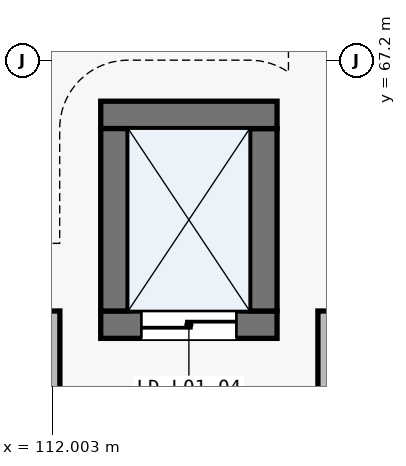
"""IFC4 building model, lengths in metres.
Left out: names, types, materials, properties, quantities, classifications, styles, units other than length and angle.
Written with IfcOpenShell. Run it as: python <this file> out.ifc"""

import sys

from ifc_helpers import new_model, si_unit, direction, frame, frame_2d, origin, place, context, subcontext, project, spatial, rectangle, extrude, element, fill, save


model = new_model("IFC4")
c1 = context("Model", 3, precision=1e-05, world=origin(), true_north=direction((0.0, 1.0)))
c2 = subcontext(c1, "Body", "Model", "MODEL_VIEW")
j1 = project(units=[si_unit("LENGTHUNIT", "METRE"), si_unit("PLANEANGLEUNIT", "RADIAN")], contexts=[c1])
p1 = place(None, origin())
s1 = spatial("IfcSite", under=j1, at=p1, CompositionType="ELEMENT")
p2 = place(p1, origin())
s2 = spatial("IfcBuilding", under=s1, at=p2, CompositionType="ELEMENT")
p3 = place(p2, origin())
s3 = spatial("IfcBuildingStorey", under=s2, at=p3, CompositionType="ELEMENT", Elevation=0.0)
p4 = place(p3, frame((112.64, 63.72, 0.0), z_axis=(0.0, 0.0, 1.0), x_axis=(1.0, 0.0, 0.0)))
e1 = element("IfcWall", 1, at=p4, inside=s3, PredefinedType="SHEAR", context=c2, shape_type="SweptSolid", body=[
    extrude(rectangle(XDim=2.32, YDim=0.36, at=frame_2d((1.16, 0.0))), origin(), (0.0, 0.0, 1.0), 5.745),
])
p5 = place(p4, frame((0.535, 0.0, 0.0)))
e2 = element("IfcOpeningElement", 2, at=p5, cuts=e1, PredefinedType="OPENING", context=c2, shape_type="SweptSolid", body=[
    extrude(rectangle(XDim=1.25, YDim=2.2, at=frame_2d((0.625, 1.1))), frame((0.0, 0.19, 0.0), z_axis=(0.0, -1.0, 0.0), x_axis=(1.0, 0.0, 0.0)), (0.0, 0.0, 1.0), 0.38),
])
p6 = place(p3, frame((114.78, 63.9, 0.0), z_axis=(0.0, 0.0, 1.0), x_axis=(0.0, 1.0, 0.0)))
e3 = element("IfcWall", 3, at=p6, inside=s3, PredefinedType="SHEAR", context=c2, shape_type="SweptSolid", body=[
    extrude(rectangle(XDim=2.4, YDim=0.36, at=frame_2d((1.2, 0.0))), origin(), (0.0, 0.0, 1.0), 5.745),
])
p7 = place(p3, frame((114.96, 66.48, 0.0), z_axis=(0.0, 0.0, 1.0), x_axis=(-1.0, 0.0, 0.0)))
e4 = element("IfcWall", 4, at=p7, inside=s3, PredefinedType="SHEAR", context=c2, shape_type="SweptSolid", body=[
    extrude(rectangle(XDim=2.32, YDim=0.36, at=frame_2d((1.16, 0.0))), origin(), (0.0, 0.0, 1.0), 5.745),
])
p8 = place(p3, frame((112.82, 66.3, 0.0), z_axis=(0.0, 0.0, 1.0), x_axis=(0.0, -1.0, 0.0)))
e5 = element("IfcWall", 5, at=p8, inside=s3, PredefinedType="SHEAR", context=c2, shape_type="SweptSolid", body=[
    extrude(rectangle(XDim=2.4, YDim=0.36, at=frame_2d((1.2, 0.0))), origin(), (0.0, 0.0, 1.0), 5.745),
])
for number, where, z_axis, x_axis in (
    (6, (115.6, 59.397, 0.0), (0.0, 0.0, 1.0), (0.0, 1.0, 0.0)),
    (7, (112.0, 63.9, 0.0), (0.0, 0.0, 1.0), (0.0, -1.0, 0.0)),
):
    element("IfcWall", number, at=place(p3, frame(where, z_axis=z_axis, x_axis=x_axis)), inside=s3, PredefinedType="PARTITIONING", context=c2, shape_type="SweptSolid", body=[
        extrude(rectangle(XDim=4.502, YDim=0.205, at=frame_2d((2.251, 0.0))), origin(), (0.0, 0.0, 1.0), 5.745),
    ])
p9 = place(p5, frame((1.25, 0.0, 0.0), z_axis=(0.0, 0.0, 1.0), x_axis=(-1.0, 0.0, 0.0)))
e8 = element("IfcDoor", 8, at=p9, inside=s3, OperationType="DOUBLE_DOOR_SLIDING", PredefinedType="DOOR", context=c2, shape_type="SweptSolid", body=[
    extrude(rectangle(XDim=1.25, YDim=2.2, at=frame_2d((0.625, 1.1))), frame((0.0, 0.025, 0.0), z_axis=(0.0, -1.0, 0.0), x_axis=(1.0, 0.0, 0.0)), (0.0, 0.0, 1.0), 0.05),
])
fill(e2, e8)
save(model, sys.argv[1])
